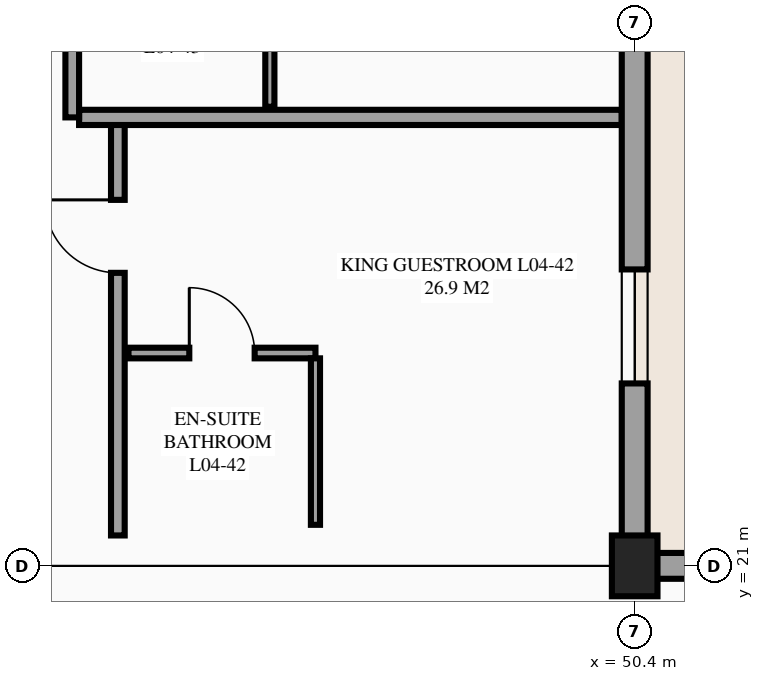
"""IFC4 building model, lengths in metres.
Left out: names, types, materials, properties, quantities, classifications, styles, units other than length and angle.
Written with IfcOpenShell. Run it as: python <this file> out.ifc"""

import sys

from ifc_helpers import new_model, si_unit, direction, frame, frame_2d, origin, origin_2d, place, context, subcontext, project, spatial, rectangle, extrude, element, fill, save


model = new_model("IFC4")
c1 = context("Model", 3, precision=1e-05, world=origin(), true_north=direction((0.0, 1.0)))
c2 = subcontext(c1, "Body", "Model", "MODEL_VIEW")
j1 = project(units=[si_unit("LENGTHUNIT", "METRE"), si_unit("PLANEANGLEUNIT", "RADIAN")], contexts=[c1])
p1 = place(None, origin())
s1 = spatial("IfcSite", under=j1, at=p1, CompositionType="ELEMENT")
p2 = place(p1, origin())
s2 = spatial("IfcBuilding", under=s1, at=p2, CompositionType="ELEMENT")
p3 = place(p2, frame((0.0, 0.0, 18.3)))
s3 = spatial("IfcBuildingStorey", under=s2, at=p3, CompositionType="ELEMENT", Elevation=18.3)
p4 = place(p3, frame((50.4, 21.0, 0.0), z_axis=(0.0, 0.0, 1.0), x_axis=(1.0, 0.0, 0.0)))
e1 = element("IfcColumn", 1, at=p4, inside=s3, PredefinedType="COLUMN", context=c2, shape_type="SweptSolid", body=[
    extrude(rectangle(XDim=0.6, YDim=0.8, at=origin_2d()), origin(), (0.0, 0.0, 1.0), 3.6),
])
p5 = place(p3, frame((43.6, 21.4, 0.0), z_axis=(0.0, 0.0, 1.0), x_axis=(0.0, 1.0, 0.0)))
e2 = element("IfcWall", 2, at=p5, inside=s3, PredefinedType="PARTITIONING", context=c2, shape_type="SweptSolid", body=[
    extrude(rectangle(XDim=5.5, YDim=0.18, at=frame_2d((2.75, 0.0))), origin(), (0.0, 0.0, 1.0), 3.375),
])
p6 = place(p5, frame((3.455, 0.0, 0.0)))
e3 = element("IfcOpeningElement", 3, at=p6, cuts=e2, PredefinedType="OPENING", context=c2, shape_type="SweptSolid", body=[
    extrude(rectangle(XDim=0.96, YDim=2.15, at=frame_2d((0.48, 1.075))), frame((0.0, 0.1, 0.0), z_axis=(0.0, -1.0, 0.0), x_axis=(1.0, 0.0, 0.0)), (0.0, 0.0, 1.0), 0.2),
])
p7 = place(p3, frame((43.09, 26.9, 0.0), z_axis=(0.0, 0.0, 1.0), x_axis=(1.0, 0.0, 0.0)))
e4 = element("IfcWall", 4, at=p7, inside=s3, PredefinedType="PARTITIONING", context=c2, shape_type="SweptSolid", body=[
    extrude(rectangle(XDim=7.14, YDim=0.2, at=frame_2d((3.57, 0.0))), origin(), (0.0, 0.0, 1.0), 3.375),
])
p8 = place(p3, frame((43.74, 23.8, 0.0), z_axis=(0.0, 0.0, 1.0), x_axis=(1.0, 0.0, 0.0)))
e5 = element("IfcWall", 5, at=p8, inside=s3, PredefinedType="PARTITIONING", context=c2, shape_type="SweptSolid", body=[
    extrude(rectangle(XDim=2.46, YDim=0.14, at=frame_2d((1.23, 0.0))), origin(), (0.0, 0.0, 1.0), 3.375),
])
p9 = place(p8, frame((0.8, 0.0, 0.0)))
e6 = element("IfcOpeningElement", 6, at=p9, cuts=e5, PredefinedType="OPENING", context=c2, shape_type="SweptSolid", body=[
    extrude(rectangle(XDim=0.86, YDim=2.1, at=frame_2d((0.43, 1.05))), frame((0.0, 0.08, 0.0), z_axis=(0.0, -1.0, 0.0), x_axis=(1.0, 0.0, 0.0)), (0.0, 0.0, 1.0), 0.16),
])
p10 = place(p3, frame((46.2, 21.54, 0.0), z_axis=(0.0, 0.0, 1.0), x_axis=(0.0, 1.0, 0.0)))
e7 = element("IfcWall", 7, at=p10, inside=s3, PredefinedType="PARTITIONING", context=c2, shape_type="SweptSolid", body=[
    extrude(rectangle(XDim=2.19, YDim=0.12, at=frame_2d((1.095, 0.0))), origin(), (0.0, 0.0, 1.0), 3.375),
])
p11 = place(p3, frame((43.0, 26.9, 0.0), z_axis=(0.0, 0.0, 1.0), x_axis=(0.0, 1.0, 0.0)))
e8 = element("IfcWall", 8, at=p11, inside=s3, PredefinedType="PARTITIONING", context=c2, shape_type="SweptSolid", body=[
    extrude(rectangle(XDim=5.5, YDim=0.18, at=frame_2d((2.75, 0.0))), origin(), (0.0, 0.0, 1.0), 3.375),
])
p12 = place(p11, frame((3.805, 0.0, 0.0)))
e9 = element("IfcOpeningElement", 9, at=p12, cuts=e8, PredefinedType="OPENING", context=c2, shape_type="SweptSolid", body=[
    extrude(rectangle(XDim=0.96, YDim=2.15, at=frame_2d((0.48, 1.075))), frame((0.0, 0.1, 0.0), z_axis=(0.0, -1.0, 0.0), x_axis=(1.0, 0.0, 0.0)), (0.0, 0.0, 1.0), 0.2),
])
p13 = place(p3, frame((45.6, 27.04, 0.0), z_axis=(0.0, 0.0, 1.0), x_axis=(0.0, 1.0, 0.0)))
e10 = element("IfcWall", 10, at=p13, inside=s3, PredefinedType="PARTITIONING", context=c2, shape_type="SweptSolid", body=[
    extrude(rectangle(XDim=2.19, YDim=0.12, at=frame_2d((1.095, 0.0))), origin(), (0.0, 0.0, 1.0), 3.375),
])
p14 = place(p3, frame((58.8, 21.0, 0.0), z_axis=(0.0, 0.0, 1.0), x_axis=(-1.0, 0.0, 0.0)))
e11 = element("IfcWall", 11, at=p14, inside=s3, PredefinedType="STANDARD", context=c2, shape_type="SweptSolid", body=[
    extrude(rectangle(XDim=8.4, YDim=0.34, at=frame_2d((4.2, 0.0))), origin(), (0.0, 0.0, 1.0), 2.53),
])
p15 = place(p14, frame((3.583, 0.0, 0.85)))
e12 = element("IfcOpeningElement", 12, at=p15, cuts=e11, PredefinedType="OPENING", context=c2, shape_type="SweptSolid", body=[
    extrude(rectangle(XDim=1.5, YDim=1.5, at=frame_2d((0.75, 0.75))), frame((0.0, 0.18, 0.0), z_axis=(0.0, -1.0, 0.0), x_axis=(1.0, 0.0, 0.0)), (0.0, 0.0, 1.0), 0.36),
])
p16 = place(p3, frame((50.4, 21.0, 0.0), z_axis=(0.0, 0.0, 1.0), x_axis=(0.0, 1.0, 0.0)))
e13 = element("IfcWall", 13, at=p16, inside=s3, PredefinedType="STANDARD", context=c2, shape_type="SweptSolid", body=[
    extrude(rectangle(XDim=8.4, YDim=0.34, at=frame_2d((4.2, 0.0))), origin(), (0.0, 0.0, 1.0), 2.63),
])
p17 = place(p16, frame((2.4, 0.0, 0.85)))
e14 = element("IfcOpeningElement", 14, at=p17, cuts=e13, PredefinedType="OPENING", context=c2, shape_type="SweptSolid", body=[
    extrude(rectangle(XDim=1.5, YDim=1.5, at=frame_2d((0.75, 0.75))), frame((0.0, 0.18, 0.0), z_axis=(0.0, -1.0, 0.0), x_axis=(1.0, 0.0, 0.0)), (0.0, 0.0, 1.0), 0.36),
])
p18 = place(p17, origin())
e15 = element("IfcWindow", 15, at=p18, inside=s3, PartitioningType="SINGLE_PANEL", PredefinedType="WINDOW", context=c2, shape_type="SweptSolid", body=[
    extrude(rectangle(XDim=1.5, YDim=1.5, at=frame_2d((0.75, 0.75))), frame((0.0, 0.03, 0.0), z_axis=(0.0, -1.0, 0.0), x_axis=(1.0, 0.0, 0.0)), (0.0, 0.0, 1.0), 0.06),
])
fill(e14, e15)
p19 = place(p6, origin())
e16 = element("IfcDoor", 16, at=p19, inside=s3, OperationType="SINGLE_SWING_RIGHT", PredefinedType="DOOR", context=c2, shape_type="SweptSolid", body=[
    extrude(rectangle(XDim=0.96, YDim=2.15, at=frame_2d((0.48, 1.075))), frame((0.0, 0.025, 0.0), z_axis=(0.0, -1.0, 0.0), x_axis=(1.0, 0.0, 0.0)), (0.0, 0.0, 1.0), 0.05),
])
fill(e3, e16)
p20 = place(p9, origin())
e17 = element("IfcDoor", 17, at=p20, inside=s3, OperationType="SINGLE_SWING_LEFT", PredefinedType="DOOR", context=c2, shape_type="SweptSolid", body=[
    extrude(rectangle(XDim=0.86, YDim=2.1, at=frame_2d((0.43, 1.05))), frame((0.0, 0.025, 0.0), z_axis=(0.0, -1.0, 0.0), x_axis=(1.0, 0.0, 0.0)), (0.0, 0.0, 1.0), 0.05),
])
fill(e6, e17)
save(model, sys.argv[1])
